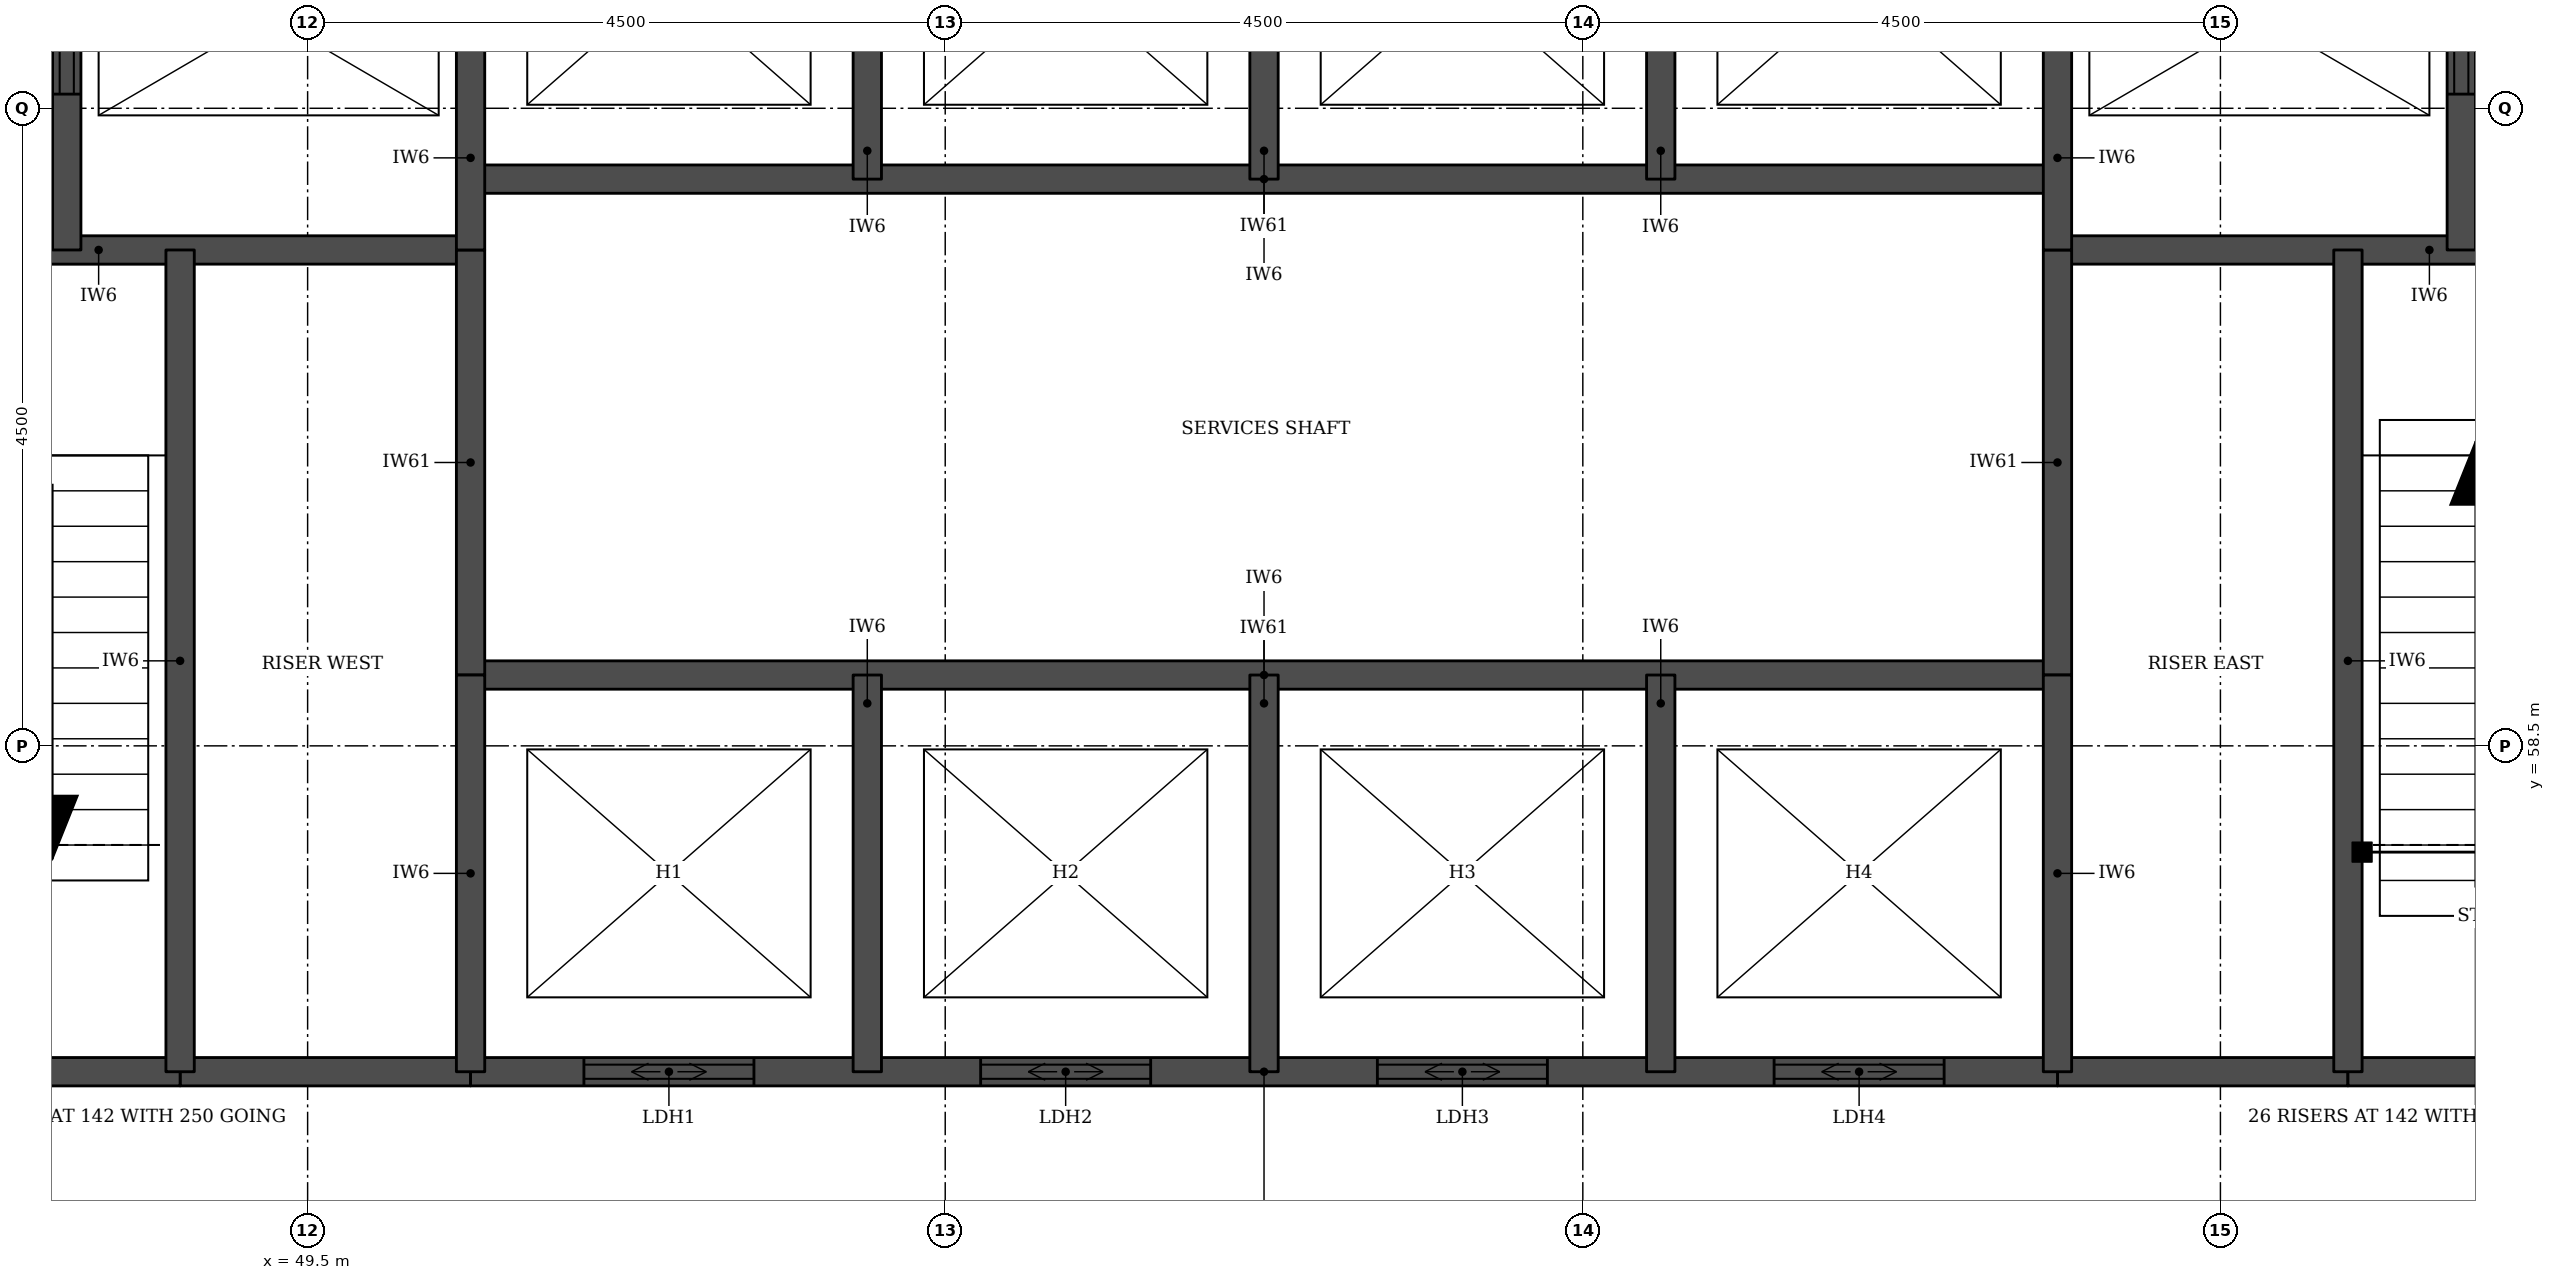
"""IFC4 building model, lengths in metres.
Left out: names, types, materials, properties, quantities, classifications, styles, units other than length and angle.
Written with IfcOpenShell. Run it as: python <this file> out.ifc"""

import sys

from ifc_helpers import new_model, si_unit, direction, frame, frame_2d, origin, place, context, subcontext, project, spatial, rectangle, extrude, element, fill, save


model = new_model("IFC4")
c1 = context("Model", 3, precision=1e-05, world=origin(), true_north=direction((0.0, 1.0)))
c2 = subcontext(c1, "Body", "Model", "MODEL_VIEW")
j1 = project(units=[si_unit("LENGTHUNIT", "METRE"), si_unit("PLANEANGLEUNIT", "RADIAN")], contexts=[c1])
p1 = place(None, origin())
s1 = spatial("IfcSite", under=j1, at=p1, CompositionType="ELEMENT")
p2 = place(p1, origin())
s2 = spatial("IfcBuilding", under=s1, at=p2, CompositionType="ELEMENT")
p3 = place(p2, frame((0.0, 0.0, 199.5)))
s3 = spatial("IfcBuildingStorey", under=s2, at=p3, CompositionType="ELEMENT", Elevation=199.5)
for number, where, z_axis, x_axis in (
    (1, (48.6, 56.2, 0.0), (0.0, 0.0, 1.0), (1.0, 0.0, 0.0)),
    (2, (61.85, 56.2, 0.0), (0.0, 0.0, 1.0), (1.0, 0.0, 0.0)),
):
    element("IfcWall", number, at=place(p3, frame(where, z_axis=z_axis, x_axis=x_axis)), inside=s3, PredefinedType="SOLIDWALL", context=c2, shape_type="SweptSolid", body=[
        extrude(rectangle(XDim=2.05, YDim=0.2, at=frame_2d((1.025, 0.0))), origin(), (0.0, 0.0, 1.0), 3.55),
    ])
p4 = place(p3, frame((45.4, 56.2, 0.0), z_axis=(0.0, 0.0, 1.0), x_axis=(1.0, 0.0, 0.0)))
e3 = element("IfcWall", 3, at=p4, inside=s3, PredefinedType="SOLIDWALL", context=c2, shape_type="SweptSolid", body=[
    extrude(rectangle(XDim=3.2, YDim=0.2, at=frame_2d((1.6, 0.0))), origin(), (0.0, 0.0, 1.0), 3.55),
])
p5 = place(p3, frame((50.65, 56.2, 0.0), z_axis=(0.0, 0.0, 1.0), x_axis=(1.0, 0.0, 0.0)))
e4 = element("IfcWall", 4, at=p5, inside=s3, PredefinedType="SOLIDWALL", context=c2, shape_type="SweptSolid", body=[
    extrude(rectangle(XDim=11.2, YDim=0.2, at=frame_2d((5.6, 0.0))), origin(), (0.0, 0.0, 1.0), 3.55),
])
p6 = place(p5, frame((0.8, 0.0, 0.0)))
e5 = element("IfcOpeningElement", 5, at=p6, cuts=e4, PredefinedType="OPENING", context=c2, shape_type="SweptSolid", body=[
    extrude(rectangle(XDim=1.2, YDim=2.1, at=frame_2d((0.6, 1.05))), frame((0.0, 0.11, 0.0), z_axis=(0.0, -1.0, 0.0), x_axis=(1.0, 0.0, 0.0)), (0.0, 0.0, 1.0), 0.22),
])
p7 = place(p5, frame((3.6, 0.0, 0.0)))
e6 = element("IfcOpeningElement", 6, at=p7, cuts=e4, PredefinedType="OPENING", context=c2, shape_type="SweptSolid", body=[
    extrude(rectangle(XDim=1.2, YDim=2.1, at=frame_2d((0.6, 1.05))), frame((0.0, 0.11, 0.0), z_axis=(0.0, -1.0, 0.0), x_axis=(1.0, 0.0, 0.0)), (0.0, 0.0, 1.0), 0.22),
])
p8 = place(p5, frame((6.4, 0.0, 0.0)))
e7 = element("IfcOpeningElement", 7, at=p8, cuts=e4, PredefinedType="OPENING", context=c2, shape_type="SweptSolid", body=[
    extrude(rectangle(XDim=1.2, YDim=2.1, at=frame_2d((0.6, 1.05))), frame((0.0, 0.11, 0.0), z_axis=(0.0, -1.0, 0.0), x_axis=(1.0, 0.0, 0.0)), (0.0, 0.0, 1.0), 0.22),
])
p9 = place(p5, frame((9.2, 0.0, 0.0)))
e8 = element("IfcOpeningElement", 8, at=p9, cuts=e4, PredefinedType="OPENING", context=c2, shape_type="SweptSolid", body=[
    extrude(rectangle(XDim=1.2, YDim=2.1, at=frame_2d((0.6, 1.05))), frame((0.0, 0.11, 0.0), z_axis=(0.0, -1.0, 0.0), x_axis=(1.0, 0.0, 0.0)), (0.0, 0.0, 1.0), 0.22),
])
p10 = place(p3, frame((63.9, 56.2, 0.0), z_axis=(0.0, 0.0, 1.0), x_axis=(1.0, 0.0, 0.0)))
e9 = element("IfcWall", 9, at=p10, inside=s3, PredefinedType="SOLIDWALL", context=c2, shape_type="SweptSolid", body=[
    extrude(rectangle(XDim=3.2, YDim=0.2, at=frame_2d((1.6, 0.0))), origin(), (0.0, 0.0, 1.0), 3.55),
])
p11 = place(p3, frame((50.65, 59.0, 0.0), z_axis=(0.0, 0.0, 1.0), x_axis=(1.0, 0.0, 0.0)))
e10 = element("IfcWall", 10, at=p11, inside=s3, PredefinedType="SOLIDWALL", context=c2, shape_type="SweptSolid", body=[
    extrude(rectangle(XDim=11.2, YDim=0.2, at=frame_2d((5.6, 0.0))), origin(), (0.0, 0.0, 1.0), 3.7),
])
for number, where, z_axis, x_axis in (
    (11, (45.4, 62.0, 0.0), (0.0, 0.0, 1.0), (1.0, 0.0, 0.0)),
    (12, (61.85, 62.0, 0.0), (0.0, 0.0, 1.0), (1.0, 0.0, 0.0)),
):
    element("IfcWall", number, at=place(p3, frame(where, z_axis=z_axis, x_axis=x_axis)), inside=s3, PredefinedType="SOLIDWALL", context=c2, shape_type="SweptSolid", body=[
        extrude(rectangle(XDim=5.25, YDim=0.2, at=frame_2d((2.625, 0.0))), origin(), (0.0, 0.0, 1.0), 3.55),
    ])
p12 = place(p3, frame((50.65, 62.5, 0.0), z_axis=(0.0, 0.0, 1.0), x_axis=(1.0, 0.0, 0.0)))
e13 = element("IfcWall", 13, at=p12, inside=s3, PredefinedType="SOLIDWALL", context=c2, shape_type="SweptSolid", body=[
    extrude(rectangle(XDim=11.2, YDim=0.2, at=frame_2d((5.6, 0.0))), origin(), (0.0, 0.0, 1.0), 3.7),
])
p13 = place(p3, frame((47.8, 62.0, 0.0), z_axis=(0.0, 0.0, 1.0), x_axis=(0.0, 1.0, 0.0)))
e14 = element("IfcWall", 14, at=p13, inside=s3, PredefinedType="SOLIDWALL", context=c2, shape_type="SweptSolid", body=[
    extrude(rectangle(XDim=3.3, YDim=0.2, at=frame_2d((1.65, 0.0))), origin(), (0.0, 0.0, 1.0), 3.55),
])
p14 = place(p13, frame((1.1, 0.0, 0.0)))
e15 = element("IfcOpeningElement", 15, at=p14, cuts=e14, PredefinedType="OPENING", context=c2, shape_type="SweptSolid", body=[
    extrude(rectangle(XDim=1.1, YDim=2.1, at=frame_2d((0.55, 1.05))), frame((0.0, 0.11, 0.0), z_axis=(0.0, -1.0, 0.0), x_axis=(1.0, 0.0, 0.0)), (0.0, 0.0, 1.0), 0.22),
])
p15 = place(p3, frame((48.6, 56.2, 0.0), z_axis=(0.0, 0.0, 1.0), x_axis=(0.0, 1.0, 0.0)))
e16 = element("IfcWall", 16, at=p15, inside=s3, PredefinedType="SOLIDWALL", context=c2, shape_type="SweptSolid", body=[
    extrude(rectangle(XDim=5.8, YDim=0.2, at=frame_2d((2.9, 0.0))), origin(), (0.0, 0.0, 1.0), 3.55),
])
p16 = place(p3, frame((50.65, 59.0, 0.0), z_axis=(0.0, 0.0, 1.0), x_axis=(0.0, 1.0, 0.0)))
e17 = element("IfcWall", 17, at=p16, inside=s3, PredefinedType="SOLIDWALL", context=c2, shape_type="SweptSolid", body=[
    extrude(rectangle(XDim=3.0, YDim=0.2, at=frame_2d((1.5, 0.0))), origin(), (0.0, 0.0, 1.0), 3.7),
])
p17 = place(p3, frame((50.65, 56.2, 0.0), z_axis=(0.0, 0.0, 1.0), x_axis=(0.0, 1.0, 0.0)))
e18 = element("IfcWall", 18, at=p17, inside=s3, PredefinedType="SOLIDWALL", context=c2, shape_type="SweptSolid", body=[
    extrude(rectangle(XDim=2.8, YDim=0.2, at=frame_2d((1.4, 0.0))), origin(), (0.0, 0.0, 1.0), 3.55),
])
p18 = place(p3, frame((50.65, 62.0, 0.0), z_axis=(0.0, 0.0, 1.0), x_axis=(0.0, 1.0, 0.0)))
e19 = element("IfcWall", 19, at=p18, inside=s3, PredefinedType="SOLIDWALL", context=c2, shape_type="SweptSolid", body=[
    extrude(rectangle(XDim=3.3, YDim=0.2, at=frame_2d((1.65, 0.0))), origin(), (0.0, 0.0, 1.0), 3.55),
])
for number, where, z_axis, x_axis in (
    (20, (53.45, 56.2, 0.0), (0.0, 0.0, 1.0), (0.0, 1.0, 0.0)),
    (21, (53.45, 62.5, 0.0), (0.0, 0.0, 1.0), (0.0, 1.0, 0.0)),
    (22, (56.25, 56.2, 0.0), (0.0, 0.0, 1.0), (0.0, 1.0, 0.0)),
    (23, (56.25, 62.5, 0.0), (0.0, 0.0, 1.0), (0.0, 1.0, 0.0)),
    (24, (59.05, 56.2, 0.0), (0.0, 0.0, 1.0), (0.0, 1.0, 0.0)),
    (25, (59.05, 62.5, 0.0), (0.0, 0.0, 1.0), (0.0, 1.0, 0.0)),
):
    element("IfcWall", number, at=place(p3, frame(where, z_axis=z_axis, x_axis=x_axis)), inside=s3, PredefinedType="SOLIDWALL", context=c2, shape_type="SweptSolid", body=[
        extrude(rectangle(XDim=2.8, YDim=0.2, at=frame_2d((1.4, 0.0))), origin(), (0.0, 0.0, 1.0), 3.55),
    ])
p19 = place(p3, frame((61.85, 59.0, 0.0), z_axis=(0.0, 0.0, 1.0), x_axis=(0.0, 1.0, 0.0)))
e26 = element("IfcWall", 26, at=p19, inside=s3, PredefinedType="SOLIDWALL", context=c2, shape_type="SweptSolid", body=[
    extrude(rectangle(XDim=3.0, YDim=0.2, at=frame_2d((1.5, 0.0))), origin(), (0.0, 0.0, 1.0), 3.7),
])
p20 = place(p3, frame((61.85, 56.2, 0.0), z_axis=(0.0, 0.0, 1.0), x_axis=(0.0, 1.0, 0.0)))
e27 = element("IfcWall", 27, at=p20, inside=s3, PredefinedType="SOLIDWALL", context=c2, shape_type="SweptSolid", body=[
    extrude(rectangle(XDim=2.8, YDim=0.2, at=frame_2d((1.4, 0.0))), origin(), (0.0, 0.0, 1.0), 3.55),
])
p21 = place(p3, frame((61.85, 62.0, 0.0), z_axis=(0.0, 0.0, 1.0), x_axis=(0.0, 1.0, 0.0)))
e28 = element("IfcWall", 28, at=p21, inside=s3, PredefinedType="SOLIDWALL", context=c2, shape_type="SweptSolid", body=[
    extrude(rectangle(XDim=3.3, YDim=0.2, at=frame_2d((1.65, 0.0))), origin(), (0.0, 0.0, 1.0), 3.55),
])
p22 = place(p3, frame((63.9, 56.2, 0.0), z_axis=(0.0, 0.0, 1.0), x_axis=(0.0, 1.0, 0.0)))
e29 = element("IfcWall", 29, at=p22, inside=s3, PredefinedType="SOLIDWALL", context=c2, shape_type="SweptSolid", body=[
    extrude(rectangle(XDim=5.8, YDim=0.2, at=frame_2d((2.9, 0.0))), origin(), (0.0, 0.0, 1.0), 3.55),
])
p23 = place(p3, frame((64.7, 62.0, 0.0), z_axis=(0.0, 0.0, 1.0), x_axis=(0.0, 1.0, 0.0)))
e30 = element("IfcWall", 30, at=p23, inside=s3, PredefinedType="SOLIDWALL", context=c2, shape_type="SweptSolid", body=[
    extrude(rectangle(XDim=3.3, YDim=0.2, at=frame_2d((1.65, 0.0))), origin(), (0.0, 0.0, 1.0), 3.55),
])
p24 = place(p23, frame((1.1, 0.0, 0.0)))
e31 = element("IfcOpeningElement", 31, at=p24, cuts=e30, PredefinedType="OPENING", context=c2, shape_type="SweptSolid", body=[
    extrude(rectangle(XDim=1.1, YDim=2.1, at=frame_2d((0.55, 1.05))), frame((0.0, 0.11, 0.0), z_axis=(0.0, -1.0, 0.0), x_axis=(1.0, 0.0, 0.0)), (0.0, 0.0, 1.0), 0.22),
])
p25 = place(p6, origin())
e32 = element("IfcDoor", 32, at=p25, inside=s3, OperationType="DOUBLE_DOOR_SLIDING", PredefinedType="DOOR", context=c2, shape_type="SweptSolid", body=[
    extrude(rectangle(XDim=1.2, YDim=2.1, at=frame_2d((0.6, 1.05))), frame((0.0, 0.025, 0.0), z_axis=(0.0, -1.0, 0.0), x_axis=(1.0, 0.0, 0.0)), (0.0, 0.0, 1.0), 0.05),
])
fill(e5, e32)
p26 = place(p7, origin())
e33 = element("IfcDoor", 33, at=p26, inside=s3, OperationType="DOUBLE_DOOR_SLIDING", PredefinedType="DOOR", context=c2, shape_type="SweptSolid", body=[
    extrude(rectangle(XDim=1.2, YDim=2.1, at=frame_2d((0.6, 1.05))), frame((0.0, 0.025, 0.0), z_axis=(0.0, -1.0, 0.0), x_axis=(1.0, 0.0, 0.0)), (0.0, 0.0, 1.0), 0.05),
])
fill(e6, e33)
p27 = place(p8, origin())
e34 = element("IfcDoor", 34, at=p27, inside=s3, OperationType="DOUBLE_DOOR_SLIDING", PredefinedType="DOOR", context=c2, shape_type="SweptSolid", body=[
    extrude(rectangle(XDim=1.2, YDim=2.1, at=frame_2d((0.6, 1.05))), frame((0.0, 0.025, 0.0), z_axis=(0.0, -1.0, 0.0), x_axis=(1.0, 0.0, 0.0)), (0.0, 0.0, 1.0), 0.05),
])
fill(e7, e34)
p28 = place(p9, origin())
e35 = element("IfcDoor", 35, at=p28, inside=s3, OperationType="DOUBLE_DOOR_SLIDING", PredefinedType="DOOR", context=c2, shape_type="SweptSolid", body=[
    extrude(rectangle(XDim=1.2, YDim=2.1, at=frame_2d((0.6, 1.05))), frame((0.0, 0.025, 0.0), z_axis=(0.0, -1.0, 0.0), x_axis=(1.0, 0.0, 0.0)), (0.0, 0.0, 1.0), 0.05),
])
fill(e8, e35)
p29 = place(p14, origin())
e36 = element("IfcDoor", 36, at=p29, inside=s3, OperationType="DOUBLE_DOOR_SLIDING", PredefinedType="DOOR", context=c2, shape_type="SweptSolid", body=[
    extrude(rectangle(XDim=1.1, YDim=2.1, at=frame_2d((0.55, 1.05))), frame((0.0, 0.025, 0.0), z_axis=(0.0, -1.0, 0.0), x_axis=(1.0, 0.0, 0.0)), (0.0, 0.0, 1.0), 0.05),
])
fill(e15, e36)
p30 = place(p24, origin())
e37 = element("IfcDoor", 37, at=p30, inside=s3, OperationType="DOUBLE_DOOR_SLIDING", PredefinedType="DOOR", context=c2, shape_type="SweptSolid", body=[
    extrude(rectangle(XDim=1.1, YDim=2.1, at=frame_2d((0.55, 1.05))), frame((0.0, 0.025, 0.0), z_axis=(0.0, -1.0, 0.0), x_axis=(1.0, 0.0, 0.0)), (0.0, 0.0, 1.0), 0.05),
])
fill(e31, e37)
save(model, sys.argv[1])
